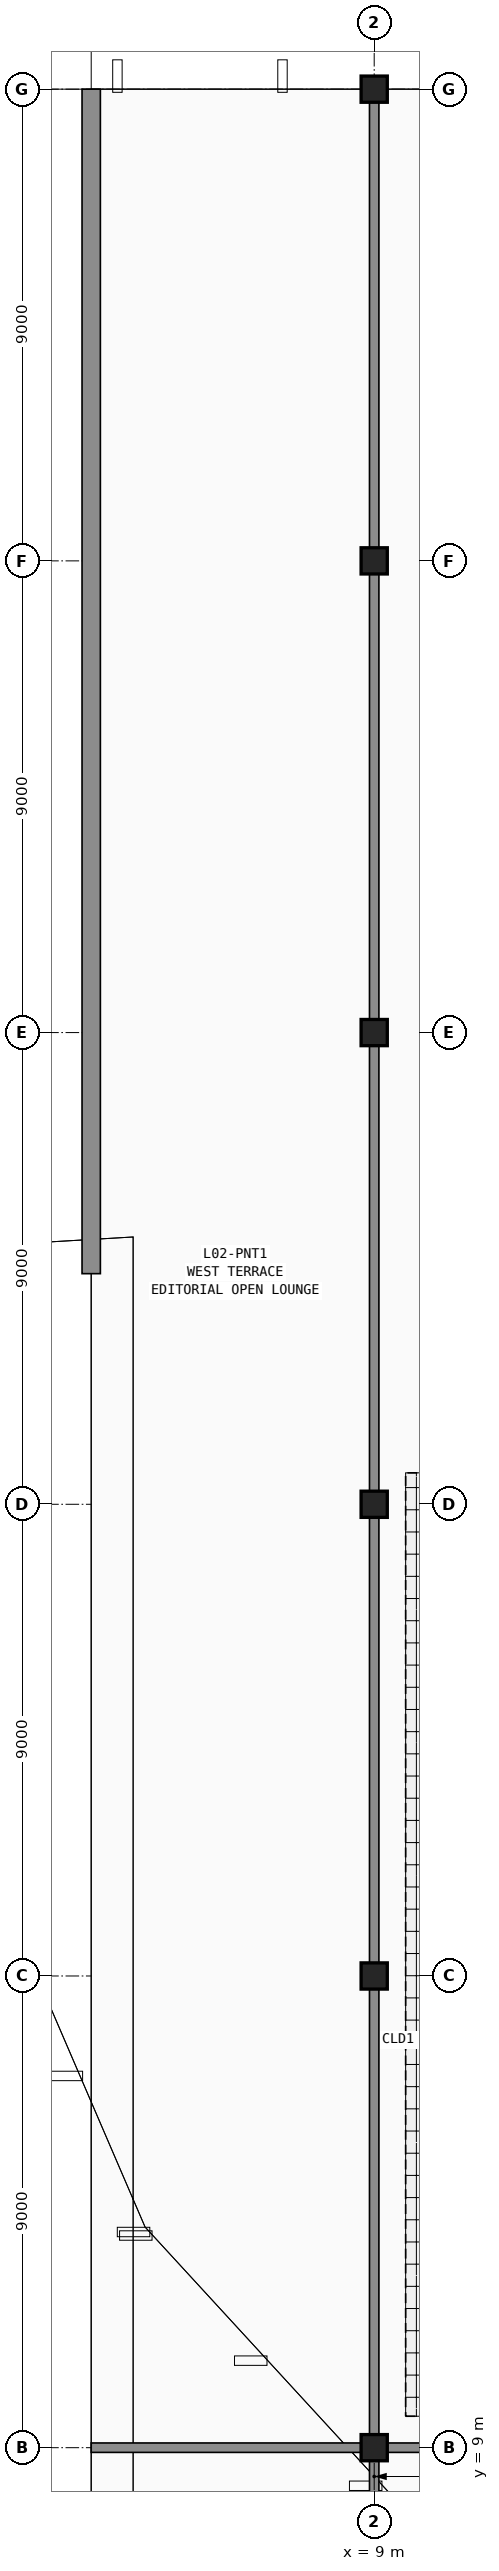
"""IFC4 building model, lengths in metres.
Left out: names, types, materials, properties, quantities, classifications, styles, units other than length and angle.
Written with IfcOpenShell. Run it as: python <this file> out.ifc"""

import sys

from ifc_helpers import new_model, si_unit, direction, frame, frame_2d, origin, origin_2d, place, context, subcontext, project, spatial, rectangle, i_section, extrude, element, fill, save


model = new_model("IFC4")
c1 = context("Model", 3, precision=1e-05, world=origin(), true_north=direction((0.0, 1.0)))
c2 = subcontext(c1, "Body", "Model", "MODEL_VIEW")
j1 = project(units=[si_unit("LENGTHUNIT", "METRE"), si_unit("PLANEANGLEUNIT", "RADIAN")], contexts=[c1])
p1 = place(None, origin())
s1 = spatial("IfcSite", under=j1, at=p1, CompositionType="ELEMENT")
p2 = place(p1, origin())
s2 = spatial("IfcBuilding", under=s1, at=p2, CompositionType="ELEMENT")
p3 = place(p2, frame((0.0, 0.0, 11.0)))
s3 = spatial("IfcBuildingStorey", under=s2, at=p3, CompositionType="ELEMENT", Elevation=11.0)
for number, where, z_axis, x_axis in (
    (1, (9.0, 9.0, 0.0), (0.0, 0.0, 1.0), (1.0, 0.0, 0.0)),
    (2, (9.0, 18.0, 0.0), (0.0, 0.0, 1.0), (1.0, 0.0, 0.0)),
    (3, (9.0, 27.0, 0.0), (0.0, 0.0, 1.0), (1.0, 0.0, 0.0)),
    (4, (9.0, 36.0, 0.0), (0.0, 0.0, 1.0), (1.0, 0.0, 0.0)),
    (5, (9.0, 45.0, 0.0), (0.0, 0.0, 1.0), (1.0, 0.0, 0.0)),
    (6, (9.0, 54.0, 0.0), (0.0, 0.0, 1.0), (1.0, 0.0, 0.0)),
):
    element("IfcColumn", number, at=place(p3, frame(where, z_axis=z_axis, x_axis=x_axis)), inside=s3, PredefinedType="COLUMN", context=c2, shape_type="SweptSolid", body=[
        extrude(i_section(OverallWidth=0.442, OverallDepth=0.531, WebThickness=0.066, FlangeThickness=0.106, FilletRadius=0.015, at=origin_2d()), origin(), (0.0, 0.0, 1.0), 5.2),
    ])
p4 = place(p3, frame((3.6, 31.4, 0.0), z_axis=(0.0, 0.0, 1.0), x_axis=(0.0, 1.0, 0.0)))
e7 = element("IfcWall", 7, at=p4, inside=s3, PredefinedType="SOLIDWALL", context=c2, shape_type="SweptSolid", body=[
    extrude(rectangle(XDim=22.6, YDim=0.35, at=frame_2d((11.3, 0.0))), origin(), (0.0, 0.0, 1.0), 4.88),
])
p5 = place(p4, frame((7.55, 0.0, 1.0)))
e8 = element("IfcOpeningElement", 8, at=p5, cuts=e7, PredefinedType="OPENING", context=c2, shape_type="SweptSolid", body=[
    extrude(rectangle(XDim=2.1, YDim=1.8, at=frame_2d((1.05, 0.9))), frame((0.0, 0.185, 0.0), z_axis=(0.0, -1.0, 0.0), x_axis=(1.0, 0.0, 0.0)), (0.0, 0.0, 1.0), 0.37),
])
p6 = place(p4, frame((16.7, 0.0, 1.0)))
e9 = element("IfcOpeningElement", 9, at=p6, cuts=e7, PredefinedType="OPENING", context=c2, shape_type="SweptSolid", body=[
    extrude(rectangle(XDim=1.8, YDim=1.8, at=frame_2d((0.9, 0.9))), frame((0.0, 0.185, 0.0), z_axis=(0.0, -1.0, 0.0), x_axis=(1.0, 0.0, 0.0)), (0.0, 0.0, 1.0), 0.37),
])
p7 = place(p3, frame((9.0, 3.6, 0.0), z_axis=(0.0, 0.0, 1.0), x_axis=(0.0, 1.0, 0.0)))
e10 = element("IfcWall", 10, at=p7, inside=s3, PredefinedType="PARTITIONING", context=c2, shape_type="SweptSolid", body=[
    extrude(rectangle(XDim=50.4, YDim=0.18, at=frame_2d((25.2, 0.0))), origin(), (0.0, 0.0, 1.0), 3.912),
])
p8 = place(p7, frame((10.4, 0.0, 0.0)))
e11 = element("IfcOpeningElement", 11, at=p8, cuts=e10, PredefinedType="OPENING", context=c2, shape_type="SweptSolid", body=[
    extrude(rectangle(XDim=1.2, YDim=2.15, at=frame_2d((0.6, 1.075))), frame((0.0, 0.1, 0.0), z_axis=(0.0, -1.0, 0.0), x_axis=(1.0, 0.0, 0.0)), (0.0, 0.0, 1.0), 0.2),
])
p9 = place(p3, frame((3.6, 9.0, 0.0), z_axis=(0.0, 0.0, 1.0), x_axis=(1.0, 0.0, 0.0)))
e12 = element("IfcWall", 12, at=p9, inside=s3, PredefinedType="PARTITIONING", context=c2, shape_type="SweptSolid", body=[
    extrude(rectangle(XDim=21.05, YDim=0.18, at=frame_2d((10.525, 0.0))), origin(), (0.0, 0.0, 1.0), 3.933),
])
p10 = place(p9, frame((9.9, 0.0, 0.0)))
e13 = element("IfcOpeningElement", 13, at=p10, cuts=e12, PredefinedType="OPENING", context=c2, shape_type="SweptSolid", body=[
    extrude(rectangle(XDim=1.05, YDim=2.15, at=frame_2d((0.525, 1.075))), frame((0.0, 0.1, 0.0), z_axis=(0.0, -1.0, 0.0), x_axis=(1.0, 0.0, 0.0)), (0.0, 0.0, 1.0), 0.2),
])
p11 = place(p5, origin())
e14 = element("IfcWindow", 14, at=p11, inside=s3, PartitioningType="SINGLE_PANEL", PredefinedType="WINDOW", context=c2, shape_type="SweptSolid", body=[
    extrude(rectangle(XDim=2.1, YDim=1.8, at=frame_2d((1.05, 0.9))), frame((0.0, 0.03, 0.0), z_axis=(0.0, -1.0, 0.0), x_axis=(1.0, 0.0, 0.0)), (0.0, 0.0, 1.0), 0.06),
])
fill(e8, e14)
p12 = place(p6, origin())
e15 = element("IfcWindow", 15, at=p12, inside=s3, PartitioningType="SINGLE_PANEL", PredefinedType="WINDOW", context=c2, shape_type="SweptSolid", body=[
    extrude(rectangle(XDim=1.8, YDim=1.8, at=frame_2d((0.9, 0.9))), frame((0.0, 0.03, 0.0), z_axis=(0.0, -1.0, 0.0), x_axis=(1.0, 0.0, 0.0)), (0.0, 0.0, 1.0), 0.06),
])
fill(e9, e15)
p13 = place(p3, frame((0.0, 0.0, -0.32)))
p14 = place(p13, frame((10.2, 48.0, 0.0)))
p15 = place(p14, frame((0.0, 0.0, 0.27)))
e16 = element("IfcDoor", 16, at=p15, inside=s3, OperationType="SINGLE_SWING_LEFT", PredefinedType="TRAPDOOR", context=c2, shape_type="SweptSolid", body=[
    extrude(rectangle(XDim=1.0, YDim=1.2, at=origin_2d()), origin(), (0.0, 0.0, 1.0), 0.05),
])
p16 = place(p8, origin())
e17 = element("IfcDoor", 17, at=p16, inside=s3, OperationType="SINGLE_SWING_RIGHT", PredefinedType="DOOR", context=c2, shape_type="SweptSolid", body=[
    extrude(rectangle(XDim=1.2, YDim=2.15, at=frame_2d((0.6, 1.075))), frame((0.0, 0.025, 0.0), z_axis=(0.0, -1.0, 0.0), x_axis=(1.0, 0.0, 0.0)), (0.0, 0.0, 1.0), 0.05),
])
fill(e11, e17)
save(model, sys.argv[1])
